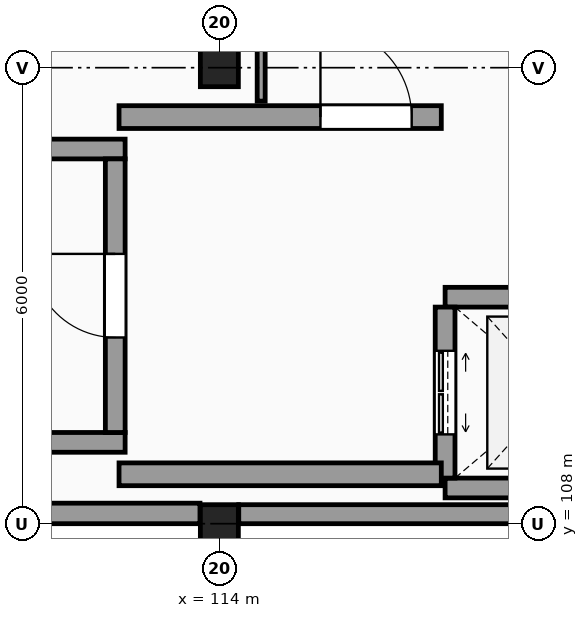
"""IFC4 building model, lengths in metres.
Left out: names, types, materials, properties, quantities, classifications, styles, units other than length and angle.
Written with IfcOpenShell. Run it as: python <this file> out.ifc"""

import sys

from ifc_helpers import new_model, si_unit, direction, frame, frame_2d, origin, origin_2d, place, context, subcontext, project, spatial, rectangle, extrude, element, fill, save


model = new_model("IFC4")
c1 = context("Model", 3, precision=1e-05, world=origin(), true_north=direction((0.0, 1.0)))
c2 = subcontext(c1, "Body", "Model", "MODEL_VIEW")
j1 = project(units=[si_unit("LENGTHUNIT", "METRE"), si_unit("PLANEANGLEUNIT", "RADIAN")], contexts=[c1])
p1 = place(None, origin())
s1 = spatial("IfcSite", under=j1, at=p1, CompositionType="ELEMENT")
p2 = place(p1, origin())
s2 = spatial("IfcBuilding", under=s1, at=p2, CompositionType="ELEMENT")
p3 = place(p2, frame((0.0, 0.0, 44.7)))
s3 = spatial("IfcBuildingStorey", under=s2, at=p3, CompositionType="ELEMENT", Elevation=44.7)
for number, where, z_axis, x_axis in (
    (1, (114.0, 108.0, 0.0), (0.0, 0.0, 1.0), (1.0, 0.0, 0.0)),
    (2, (114.0, 114.0, 0.0), (0.0, 0.0, 1.0), (1.0, 0.0, 0.0)),
):
    element("IfcColumn", number, at=place(p3, frame(where, z_axis=z_axis, x_axis=x_axis)), inside=s3, PredefinedType="COLUMN", context=c2, shape_type="SweptSolid", body=[
        extrude(rectangle(XDim=0.5, YDim=0.5, at=origin_2d()), origin(), (0.0, 0.0, 1.0), 3.3),
    ])
p4 = place(p3, frame((108.255, 108.135, 0.0), z_axis=(0.0, 0.0, 1.0), x_axis=(1.0, 0.0, 0.0)))
e3 = element("IfcWall", 3, at=p4, inside=s3, PredefinedType="SOLIDWALL", context=c2, shape_type="SweptSolid", body=[
    extrude(rectangle(XDim=5.49, YDim=0.27, at=frame_2d((2.745, 0.0))), origin(), (0.0, 0.0, 1.0), 2.4),
])
p5 = place(p3, frame((114.255, 108.125, 0.0), z_axis=(0.0, 0.0, 1.0), x_axis=(1.0, 0.0, 0.0)))
e4 = element("IfcWall", 4, at=p5, inside=s3, PredefinedType="SOLIDWALL", context=c2, shape_type="SweptSolid", body=[
    extrude(rectangle(XDim=5.49, YDim=0.25, at=frame_2d((2.745, 0.0))), origin(), (0.0, 0.0, 1.0), 2.4),
])
for number, where, z_axis, x_axis in (
    (5, (102.04, 109.07, 0.0), (0.0, 0.0, 1.0), (1.0, 0.0, 0.0)),
    (6, (102.04, 112.93, 0.0), (0.0, 0.0, 1.0), (1.0, 0.0, 0.0)),
):
    element("IfcWall", number, at=place(p3, frame(where, z_axis=z_axis, x_axis=x_axis)), inside=s3, PredefinedType="SHEAR", context=c2, shape_type="SweptSolid", body=[
        extrude(rectangle(XDim=10.72, YDim=0.26, at=frame_2d((5.36, 0.0))), origin(), (0.0, 0.0, 1.0), 3.3),
    ])
p6 = place(p3, frame((112.63, 109.2, 0.0), z_axis=(0.0, 0.0, 1.0), x_axis=(0.0, 1.0, 0.0)))
e7 = element("IfcWall", 7, at=p6, inside=s3, PredefinedType="SHEAR", context=c2, shape_type="SweptSolid", body=[
    extrude(rectangle(XDim=3.6, YDim=0.26, at=frame_2d((1.8, 0.0))), origin(), (0.0, 0.0, 1.0), 3.3),
])
p7 = place(p6, frame((1.25, 0.0, 0.0)))
e8 = element("IfcOpeningElement", 8, at=p7, cuts=e7, PredefinedType="OPENING", context=c2, shape_type="SweptSolid", body=[
    extrude(rectangle(XDim=1.1, YDim=2.15, at=frame_2d((0.55, 1.075))), frame((0.0, 0.14, 0.0), z_axis=(0.0, -1.0, 0.0), x_axis=(1.0, 0.0, 0.0)), (0.0, 0.0, 1.0), 0.28),
])
for number, where, z_axis, x_axis in (
    (9, (116.97, 108.47, 0.0), (0.0, 0.0, 1.0), (1.0, 0.0, 0.0)),
    (10, (116.97, 110.98, 0.0), (0.0, 0.0, 1.0), (1.0, 0.0, 0.0)),
):
    element("IfcWall", number, at=place(p3, frame(where, z_axis=z_axis, x_axis=x_axis)), inside=s3, PredefinedType="SHEAR", context=c2, shape_type="SweptSolid", body=[
        extrude(rectangle(XDim=2.91, YDim=0.26, at=frame_2d((1.455, 0.0))), origin(), (0.0, 0.0, 1.0), 3.3),
    ])
p8 = place(p3, frame((116.97, 108.6, 0.0), z_axis=(0.0, 0.0, 1.0), x_axis=(0.0, 1.0, 0.0)))
e11 = element("IfcWall", 11, at=p8, inside=s3, PredefinedType="SHEAR", context=c2, shape_type="SweptSolid", body=[
    extrude(rectangle(XDim=2.25, YDim=0.26, at=frame_2d((1.125, 0.0))), origin(), (0.0, 0.0, 1.0), 3.3),
])
p9 = place(p8, frame((0.575, 0.0, 0.0)))
e12 = element("IfcOpeningElement", 12, at=p9, cuts=e11, PredefinedType="OPENING", context=c2, shape_type="SweptSolid", body=[
    extrude(rectangle(XDim=1.1, YDim=2.2, at=frame_2d((0.55, 1.1))), frame((0.0, 0.14, 0.0), z_axis=(0.0, -1.0, 0.0), x_axis=(1.0, 0.0, 0.0)), (0.0, 0.0, 1.0), 0.28),
])
p10 = place(p3, frame((112.68, 113.35, 0.0), z_axis=(0.0, 0.0, 1.0), x_axis=(1.0, 0.0, 0.0)))
e13 = element("IfcWall", 13, at=p10, inside=s3, PredefinedType="SHEAR", context=c2, shape_type="SweptSolid", body=[
    extrude(rectangle(XDim=4.24, YDim=0.3, at=frame_2d((2.12, 0.0))), origin(), (0.0, 0.0, 1.0), 3.3),
])
p11 = place(p10, frame((2.65, 0.0, 0.0)))
e14 = element("IfcOpeningElement", 14, at=p11, cuts=e13, PredefinedType="OPENING", context=c2, shape_type="SweptSolid", body=[
    extrude(rectangle(XDim=1.2, YDim=2.2, at=frame_2d((0.6, 1.1))), frame((0.0, 0.16, 0.0), z_axis=(0.0, -1.0, 0.0), x_axis=(1.0, 0.0, 0.0)), (0.0, 0.0, 1.0), 0.32),
])
p12 = place(p3, frame((112.68, 108.65, 0.0), z_axis=(0.0, 0.0, 1.0), x_axis=(1.0, 0.0, 0.0)))
e15 = element("IfcWall", 15, at=p12, inside=s3, PredefinedType="SHEAR", context=c2, shape_type="SweptSolid", body=[
    extrude(rectangle(XDim=4.24, YDim=0.3, at=frame_2d((2.12, 0.0))), origin(), (0.0, 0.0, 1.0), 3.3),
])
p13 = place(p3, frame((114.55, 113.56, 0.0), z_axis=(0.0, 0.0, 1.0), x_axis=(0.0, 1.0, 0.0)))
e16 = element("IfcWall", 16, at=p13, inside=s3, PredefinedType="PARTITIONING", context=c2, shape_type="SweptSolid", body=[
    extrude(rectangle(XDim=2.24, YDim=0.105, at=frame_2d((1.12, 0.0))), origin(), (0.0, 0.0, 1.0), 3.05),
])
p14 = place(p7, origin())
e17 = element("IfcDoor", 17, at=p14, inside=s3, OperationType="SINGLE_SWING_RIGHT", PredefinedType="DOOR", context=c2, shape_type="SweptSolid", body=[
    extrude(rectangle(XDim=1.1, YDim=2.15, at=frame_2d((0.55, 1.075))), frame((0.0, 0.025, 0.0), z_axis=(0.0, -1.0, 0.0), x_axis=(1.0, 0.0, 0.0)), (0.0, 0.0, 1.0), 0.05),
])
fill(e8, e17)
p15 = place(p9, origin())
e18 = element("IfcDoor", 18, at=p15, inside=s3, OperationType="DOUBLE_DOOR_SLIDING", PredefinedType="DOOR", context=c2, shape_type="SweptSolid", body=[
    extrude(rectangle(XDim=1.1, YDim=2.2, at=frame_2d((0.55, 1.1))), frame((0.0, 0.025, 0.0), z_axis=(0.0, -1.0, 0.0), x_axis=(1.0, 0.0, 0.0)), (0.0, 0.0, 1.0), 0.05),
])
fill(e12, e18)
p16 = place(p11, origin())
e19 = element("IfcDoor", 19, at=p16, inside=s3, OperationType="SINGLE_SWING_LEFT", PredefinedType="DOOR", context=c2, shape_type="SweptSolid", body=[
    extrude(rectangle(XDim=1.2, YDim=2.2, at=frame_2d((0.6, 1.1))), frame((0.0, 0.025, 0.0), z_axis=(0.0, -1.0, 0.0), x_axis=(1.0, 0.0, 0.0)), (0.0, 0.0, 1.0), 0.05),
])
fill(e14, e19)
save(model, sys.argv[1])
